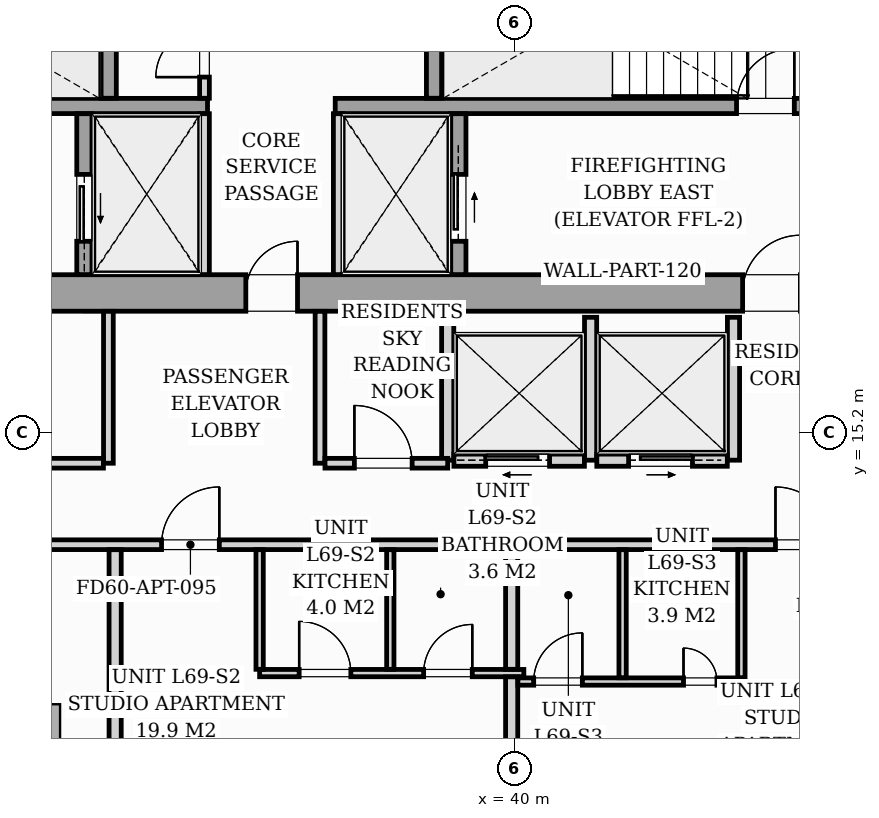
"""IFC4 building model, lengths in metres.
Left out: names, types, materials, properties, quantities, classifications, styles, units other than length and angle.
Written with IfcOpenShell. Run it as: python <this file> out.ifc"""

import sys

from ifc_helpers import new_model, si_unit, direction, frame, frame_2d, origin, origin_2d, place, context, subcontext, project, spatial, rectangle, i_section, extrude, source, transform, mapped, element, fill, save


model = new_model("IFC4")
c1 = context("Model", 3, precision=1e-05, world=origin(), true_north=direction((0.0, 1.0)))
c2 = subcontext(c1, "Body", "Model", "MODEL_VIEW")
j1 = project(units=[si_unit("LENGTHUNIT", "METRE"), si_unit("PLANEANGLEUNIT", "RADIAN")], contexts=[c1])
p1 = place(None, origin())
s1 = spatial("IfcSite", under=j1, at=p1, CompositionType="ELEMENT")
p2 = place(p1, origin())
s2 = spatial("IfcBuilding", under=s1, at=p2, CompositionType="ELEMENT")
p3 = place(p2, frame((0.0, 0.0, 239.7)))
s3 = spatial("IfcBuildingStorey", under=s2, at=p3, CompositionType="ELEMENT", Elevation=239.7)
m1 = source(origin(), c2, "Body", "SweptSolid", [
    extrude(i_section(OverallWidth=0.409, OverallDepth=0.425, WebThickness=0.033, FlangeThickness=0.052, FilletRadius=0.018, at=origin_2d()), origin(), (0.0, 0.0, 1.0), 3.296),
])
for number, where, z_axis, x_axis in (
    (1, (33.12, 17.4, 0.002), (0.0, 0.0, 1.0), (1.0, 0.0, 0.0)),
    (2, (38.88, 17.4, 0.002), (0.0, 0.0, 1.0), (1.0, 0.0, 0.0)),
):
    element("IfcColumn", number, at=place(p3, frame(where, z_axis=z_axis, x_axis=x_axis)), inside=s3, PredefinedType="PILASTER", context=c2, shape_type="MappedRepresentation", body=[
        mapped(m1, transform((0.0, 0.0, 0.0), scale=1.0)),
    ])
m2 = source(origin(), c2, "Body", "SweptSolid", [
    extrude(rectangle(XDim=0.85, YDim=0.85, at=origin_2d()), origin(), (0.0, 0.0, 1.0), 3.296),
])
p4 = place(p3, frame((32.1, 10.312, 0.002), z_axis=(0.0, 0.0, 1.0), x_axis=(0.995884398616, -0.090632580198, 0.0)))
e3 = element("IfcColumn", 3, at=p4, inside=s3, PredefinedType="COLUMN", context=c2, shape_type="MappedRepresentation", body=[
    mapped(m2, transform((0.0, 0.0, 0.0), scale=1.0)),
])
p5 = place(p3, frame((26.2, 17.5, 0.0), z_axis=(0.0, 0.0, 1.0), x_axis=(1.0, 0.0, 0.0)))
e4 = element("IfcWall", 4, at=p5, inside=s3, PredefinedType="SHEAR", context=c2, shape_type="SweptSolid", body=[
    extrude(rectangle(XDim=19.6, YDim=0.6, at=frame_2d((9.8, 0.0))), origin(), (0.0, 0.0, 1.0), 3.3),
])
p6 = place(p5, frame((0.95, 0.0, 0.0)))
e5 = element("IfcOpeningElement", 5, at=p6, cuts=e4, PredefinedType="OPENING", context=c2, shape_type="SweptSolid", body=[
    extrude(rectangle(XDim=0.95, YDim=2.06, at=frame_2d((0.475, 1.03))), frame((0.0, 0.31, 0.0), z_axis=(0.0, -1.0, 0.0), x_axis=(1.0, 0.0, 0.0)), (0.0, 0.0, 1.0), 0.62),
])
p7 = place(p5, frame((9.38, 0.0, 0.0)))
e6 = element("IfcOpeningElement", 6, at=p7, cuts=e4, PredefinedType="OPENING", context=c2, shape_type="SweptSolid", body=[
    extrude(rectangle(XDim=0.85, YDim=2.0, at=frame_2d((0.425, 1.0))), frame((0.0, 0.31, 0.0), z_axis=(0.0, -1.0, 0.0), x_axis=(1.0, 0.0, 0.0)), (0.0, 0.0, 1.0), 0.62),
])
p8 = place(p5, frame((17.55, 0.0, 0.0)))
e7 = element("IfcOpeningElement", 7, at=p8, cuts=e4, PredefinedType="OPENING", context=c2, shape_type="SweptSolid", body=[
    extrude(rectangle(XDim=0.95, YDim=2.06, at=frame_2d((0.475, 1.03))), frame((0.0, 0.31, 0.0), z_axis=(0.0, -1.0, 0.0), x_axis=(1.0, 0.0, 0.0)), (0.0, 0.0, 1.0), 0.62),
])
p9 = place(p3, frame((26.802, 20.575, 0.0), z_axis=(0.0, 0.0, 1.0), x_axis=(1.0, 0.0, 0.0)))
e8 = element("IfcWall", 8, at=p9, inside=s3, PredefinedType="SOLIDWALL", context=c2, shape_type="SweptSolid", body=[
    extrude(rectangle(XDim=8.148, YDim=0.25, at=frame_2d((4.074, 0.0))), origin(), (0.0, 0.0, 1.0), 3.3),
])
p10 = place(p9, frame((0.298, 0.0, 0.0)))
e9 = element("IfcOpeningElement", 9, at=p10, cuts=e8, PredefinedType="OPENING", context=c2, shape_type="SweptSolid", body=[
    extrude(rectangle(XDim=0.95, YDim=2.06, at=frame_2d((0.475, 1.03))), frame((0.0, 0.135, 0.0), z_axis=(0.0, -1.0, 0.0), x_axis=(1.0, 0.0, 0.0)), (0.0, 0.0, 1.0), 0.27),
])
p11 = place(p3, frame((37.05, 20.575, 0.0), z_axis=(0.0, 0.0, 1.0), x_axis=(1.0, 0.0, 0.0)))
e10 = element("IfcWall", 10, at=p11, inside=s3, PredefinedType="SOLIDWALL", context=c2, shape_type="SweptSolid", body=[
    extrude(rectangle(XDim=8.148, YDim=0.25, at=frame_2d((4.074, 0.0))), origin(), (0.0, 0.0, 1.0), 3.3),
])
p12 = place(p11, frame((6.6, 0.0, 0.0)))
e11 = element("IfcOpeningElement", 11, at=p12, cuts=e10, PredefinedType="OPENING", context=c2, shape_type="SweptSolid", body=[
    extrude(rectangle(XDim=0.95, YDim=2.06, at=frame_2d((0.475, 1.03))), frame((0.0, 0.135, 0.0), z_axis=(0.0, -1.0, 0.0), x_axis=(1.0, 0.0, 0.0)), (0.0, 0.0, 1.0), 0.27),
])
for number, where, z_axis, x_axis in (
    (12, (33.325, 20.702, 0.0), (0.0, 0.0, 1.0), (0.0, 1.0, 0.0)),
    (13, (38.675, 20.702, 0.0), (0.0, 0.0, 1.0), (0.0, 1.0, 0.0)),
):
    element("IfcWall", number, at=place(p3, frame(where, z_axis=z_axis, x_axis=x_axis)), inside=s3, PredefinedType="SOLIDWALL", context=c2, shape_type="SweptSolid", body=[
        extrude(rectangle(XDim=2.896, YDim=0.25, at=frame_2d((1.448, 0.0))), origin(), (0.0, 0.0, 1.0), 3.3),
    ])
p13 = place(p3, frame((32.925, 17.802, 0.0), z_axis=(0.0, 0.0, 1.0), x_axis=(0.0, 1.0, 0.0)))
e14 = element("IfcWall", 14, at=p13, inside=s3, PredefinedType="SOLIDWALL", context=c2, shape_type="SweptSolid", body=[
    extrude(rectangle(XDim=2.646, YDim=0.25, at=frame_2d((1.323, 0.0))), origin(), (0.0, 0.0, 1.0), 3.3),
])
p14 = place(p13, frame((0.548, 0.0, 0.0)))
e15 = element("IfcOpeningElement", 15, at=p14, cuts=e14, PredefinedType="OPENING", context=c2, shape_type="SweptSolid", body=[
    extrude(rectangle(XDim=1.1, YDim=2.08, at=frame_2d((0.55, 1.04))), frame((0.0, 0.135, 0.0), z_axis=(0.0, -1.0, 0.0), x_axis=(1.0, 0.0, 0.0)), (0.0, 0.0, 1.0), 0.27),
])
for number, where, z_axis, x_axis in (
    (16, (34.9, 17.802, 0.0), (0.0, 0.0, 1.0), (0.0, 1.0, 0.0)),
    (17, (37.1, 17.802, 0.0), (0.0, 0.0, 1.0), (0.0, 1.0, 0.0)),
):
    element("IfcWall", number, at=place(p3, frame(where, z_axis=z_axis, x_axis=x_axis)), inside=s3, PredefinedType="PARTITIONING", context=c2, shape_type="SweptSolid", body=[
        extrude(rectangle(XDim=2.646, YDim=0.16, at=frame_2d((1.323, 0.0))), origin(), (0.0, 0.0, 1.0), 3.04),
    ])
p15 = place(p3, frame((39.075, 17.802, 0.0), z_axis=(0.0, 0.0, 1.0), x_axis=(0.0, 1.0, 0.0)))
e18 = element("IfcWall", 18, at=p15, inside=s3, PredefinedType="SOLIDWALL", context=c2, shape_type="SweptSolid", body=[
    extrude(rectangle(XDim=2.646, YDim=0.25, at=frame_2d((1.323, 0.0))), origin(), (0.0, 0.0, 1.0), 3.3),
])
p16 = place(p15, frame((0.548, 0.0, 0.0)))
e19 = element("IfcOpeningElement", 19, at=p16, cuts=e18, PredefinedType="OPENING", context=c2, shape_type="SweptSolid", body=[
    extrude(rectangle(XDim=1.1, YDim=2.08, at=frame_2d((0.55, 1.04))), frame((0.0, 0.135, 0.0), z_axis=(0.0, -1.0, 0.0), x_axis=(1.0, 0.0, 0.0)), (0.0, 0.0, 1.0), 0.27),
])
p17 = place(p3, frame((34.9, 20.702, 0.0), z_axis=(0.0, 0.0, 1.0), x_axis=(0.0, 1.0, 0.0)))
e20 = element("IfcWall", 20, at=p17, inside=s3, PredefinedType="PARTITIONING", context=c2, shape_type="SweptSolid", body=[
    extrude(rectangle(XDim=2.896, YDim=0.16, at=frame_2d((1.448, 0.0))), origin(), (0.0, 0.0, 1.0), 3.04),
])
p18 = place(p17, frame((0.348, 0.0, 0.0)))
e21 = element("IfcOpeningElement", 21, at=p18, cuts=e20, PredefinedType="OPENING", context=c2, shape_type="SweptSolid", body=[
    extrude(rectangle(XDim=0.8, YDim=2.05, at=frame_2d((0.4, 1.025))), frame((0.0, 0.09, 0.0), z_axis=(0.0, -1.0, 0.0), x_axis=(1.0, 0.0, 0.0)), (0.0, 0.0, 1.0), 0.18),
])
for number, where, z_axis, x_axis in (
    (22, (38.9, 14.75, 0.0), (0.0, 0.0, 1.0), (0.0, 1.0, 0.0)),
    (23, (41.25, 14.75, 0.0), (0.0, 0.0, 1.0), (0.0, 1.0, 0.0)),
    (24, (43.6, 14.75, 0.0), (0.0, 0.0, 1.0), (0.0, 1.0, 0.0)),
):
    element("IfcWall", number, at=place(p3, frame(where, z_axis=z_axis, x_axis=x_axis)), inside=s3, PredefinedType="PARTITIONING", context=c2, shape_type="SweptSolid", body=[
        extrude(rectangle(XDim=2.35, YDim=0.2, at=frame_2d((1.175, 0.0))), origin(), (0.0, 0.0, 1.0), 3.04),
    ])
p19 = place(p3, frame((39.002, 14.75, 0.0), z_axis=(0.0, 0.0, 1.0), x_axis=(1.0, 0.0, 0.0)))
e25 = element("IfcWall", 25, at=p19, inside=s3, PredefinedType="PARTITIONING", context=c2, shape_type="SweptSolid", body=[
    extrude(rectangle(XDim=2.146, YDim=0.2, at=frame_2d((1.073, 0.0))), origin(), (0.0, 0.0, 1.0), 3.04),
])
p20 = place(p19, frame((0.523, 0.0, 0.0)))
e26 = element("IfcOpeningElement", 26, at=p20, cuts=e25, PredefinedType="OPENING", context=c2, shape_type="SweptSolid", body=[
    extrude(rectangle(XDim=1.05, YDim=2.08, at=frame_2d((0.525, 1.04))), frame((0.0, 0.11, 0.0), z_axis=(0.0, -1.0, 0.0), x_axis=(1.0, 0.0, 0.0)), (0.0, 0.0, 1.0), 0.22),
])
p21 = place(p3, frame((41.352, 14.75, 0.0), z_axis=(0.0, 0.0, 1.0), x_axis=(1.0, 0.0, 0.0)))
e27 = element("IfcWall", 27, at=p21, inside=s3, PredefinedType="PARTITIONING", context=c2, shape_type="SweptSolid", body=[
    extrude(rectangle(XDim=2.146, YDim=0.2, at=frame_2d((1.073, 0.0))), origin(), (0.0, 0.0, 1.0), 3.04),
])
p22 = place(p21, frame((0.523, 0.0, 0.0)))
e28 = element("IfcOpeningElement", 28, at=p22, cuts=e27, PredefinedType="OPENING", context=c2, shape_type="SweptSolid", body=[
    extrude(rectangle(XDim=1.05, YDim=2.08, at=frame_2d((0.525, 1.04))), frame((0.0, 0.11, 0.0), z_axis=(0.0, -1.0, 0.0), x_axis=(1.0, 0.0, 0.0)), (0.0, 0.0, 1.0), 0.22),
])
p23 = place(p3, frame((26.12, 13.36, 0.0), z_axis=(0.0, 0.0, 1.0), x_axis=(1.0, 0.0, 0.0)))
e29 = element("IfcWall", 29, at=p23, inside=s3, PredefinedType="PARTITIONING", context=c2, shape_type="SweptSolid", body=[
    extrude(rectangle(XDim=19.76, YDim=0.16, at=frame_2d((9.88, 0.0))), origin(), (0.0, 0.0, 1.0), 2.605),
])
p24 = place(p23, frame((5.221, 0.0, 0.0)))
e30 = element("IfcOpeningElement", 30, at=p24, cuts=e29, PredefinedType="OPENING", context=c2, shape_type="SweptSolid", body=[
    extrude(rectangle(XDim=0.95, YDim=2.06, at=frame_2d((0.475, 1.03))), frame((0.0, 0.09, 0.0), z_axis=(0.0, -1.0, 0.0), x_axis=(1.0, 0.0, 0.0)), (0.0, 0.0, 1.0), 0.18),
])
p25 = place(p23, frame((8.074, 0.0, 0.0)))
e31 = element("IfcOpeningElement", 31, at=p25, cuts=e29, PredefinedType="OPENING", context=c2, shape_type="SweptSolid", body=[
    extrude(rectangle(XDim=0.95, YDim=2.06, at=frame_2d((0.475, 1.03))), frame((0.0, 0.09, 0.0), z_axis=(0.0, -1.0, 0.0), x_axis=(1.0, 0.0, 0.0)), (0.0, 0.0, 1.0), 0.18),
])
p26 = place(p23, frame((18.17, 0.0, 0.0)))
e32 = element("IfcOpeningElement", 32, at=p26, cuts=e29, PredefinedType="OPENING", context=c2, shape_type="SweptSolid", body=[
    extrude(rectangle(XDim=0.95, YDim=2.06, at=frame_2d((0.475, 1.03))), frame((0.0, 0.09, 0.0), z_axis=(0.0, -1.0, 0.0), x_axis=(1.0, 0.0, 0.0)), (0.0, 0.0, 1.0), 0.18),
])
p27 = place(p3, frame((33.431, 9.086, 0.0), z_axis=(0.0, 0.0, 1.0), x_axis=(0.0, 1.0, 0.0)))
e33 = element("IfcWall", 33, at=p27, inside=s3, PredefinedType="PARTITIONING", context=c2, shape_type="SweptSolid", body=[
    extrude(rectangle(XDim=4.192, YDim=0.2, at=frame_2d((2.096, 0.0))), origin(), (0.0, 0.0, 1.0), 3.04),
])
p28 = place(p3, frame((35.807, 11.249, 0.0), z_axis=(0.0, 0.0, 1.0), x_axis=(1.0, 0.0, 0.0)))
e34 = element("IfcWall", 34, at=p28, inside=s3, PredefinedType="PARTITIONING", context=c2, shape_type="SweptSolid", body=[
    extrude(rectangle(XDim=4.345, YDim=0.12, at=frame_2d((2.173, 0.0))), origin(), (0.0, 0.0, 1.0), 3.04),
])
p29 = place(p28, frame((0.65, 0.0, 0.0)))
e35 = element("IfcOpeningElement", 35, at=p29, cuts=e34, PredefinedType="OPENING", context=c2, shape_type="SweptSolid", body=[
    extrude(rectangle(XDim=0.85, YDim=2.05, at=frame_2d((0.425, 1.025))), frame((0.0, 0.07, 0.0), z_axis=(0.0, -1.0, 0.0), x_axis=(1.0, 0.0, 0.0)), (0.0, 0.0, 1.0), 0.14),
])
p30 = place(p28, frame((2.697, 0.0, 0.0)))
e36 = element("IfcOpeningElement", 36, at=p30, cuts=e34, PredefinedType="OPENING", context=c2, shape_type="SweptSolid", body=[
    extrude(rectangle(XDim=0.8, YDim=2.02, at=frame_2d((0.4, 1.01))), frame((0.0, 0.07, 0.0), z_axis=(0.0, -1.0, 0.0), x_axis=(1.0, 0.0, 0.0)), (0.0, 0.0, 1.0), 0.14),
])
for number, where, z_axis, x_axis in (
    (37, (35.807, 11.311, 0.0), (0.0, 0.0, 1.0), (0.0, 1.0, 0.0)),
    (38, (37.956, 11.311, 0.0), (0.0, 0.0, 1.0), (0.0, 1.0, 0.0)),
):
    element("IfcWall", number, at=place(p3, frame(where, z_axis=z_axis, x_axis=x_axis)), inside=s3, PredefinedType="PARTITIONING", context=c2, shape_type="SweptSolid", body=[
        extrude(rectangle(XDim=1.967, YDim=0.12, at=frame_2d((0.983, 0.0))), origin(), (0.0, 0.0, 1.0), 3.04),
    ])
p31 = place(p3, frame((39.952, 8.675, 0.0), z_axis=(0.0, 0.0, 1.0), x_axis=(0.0, 1.0, 0.0)))
e39 = element("IfcWall", 39, at=p31, inside=s3, PredefinedType="PARTITIONING", context=c2, shape_type="SweptSolid", body=[
    extrude(rectangle(XDim=2.512, YDim=0.2, at=frame_2d((1.256, 0.0))), origin(), (0.0, 0.0, 1.0), 3.04),
])
p32 = place(p3, frame((39.952, 11.311, 0.0), z_axis=(0.0, 0.0, 1.0), x_axis=(0.0, 1.0, 0.0)))
e40 = element("IfcWall", 40, at=p32, inside=s3, PredefinedType="PARTITIONING", context=c2, shape_type="SweptSolid", body=[
    extrude(rectangle(XDim=1.967, YDim=0.2, at=frame_2d((0.983, 0.0))), origin(), (0.0, 0.0, 1.0), 3.04),
])
p33 = place(p3, frame((40.054, 11.11, 0.0), z_axis=(0.0, 0.0, 1.0), x_axis=(1.0, 0.0, 0.0)))
e41 = element("IfcWall", 41, at=p33, inside=s3, PredefinedType="PARTITIONING", context=c2, shape_type="SweptSolid", body=[
    extrude(rectangle(XDim=3.676, YDim=0.12, at=frame_2d((1.838, 0.0))), origin(), (0.0, 0.0, 1.0), 3.04),
])
p34 = place(p33, frame((0.26, 0.0, 0.0)))
e42 = element("IfcOpeningElement", 42, at=p34, cuts=e41, PredefinedType="OPENING", context=c2, shape_type="SweptSolid", body=[
    extrude(rectangle(XDim=0.8, YDim=2.02, at=frame_2d((0.4, 1.01))), frame((0.0, 0.07, 0.0), z_axis=(0.0, -1.0, 0.0), x_axis=(1.0, 0.0, 0.0)), (0.0, 0.0, 1.0), 0.14),
])
p35 = place(p33, frame((2.724, 0.0, 0.0)))
e43 = element("IfcOpeningElement", 43, at=p35, cuts=e41, PredefinedType="OPENING", context=c2, shape_type="SweptSolid", body=[
    extrude(rectangle(XDim=0.55, YDim=2.0, at=frame_2d((0.275, 1.0))), frame((0.0, 0.07, 0.0), z_axis=(0.0, -1.0, 0.0), x_axis=(1.0, 0.0, 0.0)), (0.0, 0.0, 1.0), 0.14),
])
for number, where, z_axis, x_axis in (
    (44, (43.73, 11.172, 0.0), (0.0, 0.0, 1.0), (0.0, 1.0, 0.0)),
    (45, (41.776, 11.172, 0.0), (0.0, 0.0, 1.0), (0.0, 1.0, 0.0)),
):
    element("IfcWall", number, at=place(p3, frame(where, z_axis=z_axis, x_axis=x_axis)), inside=s3, PredefinedType="PARTITIONING", context=c2, shape_type="SweptSolid", body=[
        extrude(rectangle(XDim=2.106, YDim=0.12, at=frame_2d((1.053, 0.0))), origin(), (0.0, 0.0, 1.0), 3.04),
    ])
p36 = place(p3, frame((33.32, 14.7, 0.0), z_axis=(0.0, 0.0, 1.0), x_axis=(0.0, 1.0, 0.0)))
e46 = element("IfcWall", 46, at=p36, inside=s3, PredefinedType="PARTITIONING", context=c2, shape_type="SweptSolid", body=[
    extrude(rectangle(XDim=2.498, YDim=0.16, at=frame_2d((1.249, 0.0))), origin(), (0.0, 0.0, 1.0), 3.04),
])
p37 = place(p3, frame((28.442, 14.7, 0.0), z_axis=(0.0, 0.0, 1.0), x_axis=(1.0, 0.0, 0.0)))
e47 = element("IfcWall", 47, at=p37, inside=s3, PredefinedType="PARTITIONING", context=c2, shape_type="SweptSolid", body=[
    extrude(rectangle(XDim=4.796, YDim=0.16, at=frame_2d((2.398, 0.0))), origin(), (0.0, 0.0, 1.0), 2.605),
])
p38 = place(p37, frame((1.923, 0.0, 0.0)))
e48 = element("IfcOpeningElement", 48, at=p38, cuts=e47, PredefinedType="OPENING", context=c2, shape_type="SweptSolid", body=[
    extrude(rectangle(XDim=0.95, YDim=2.06, at=frame_2d((0.475, 1.03))), frame((0.0, 0.09, 0.0), z_axis=(0.0, -1.0, 0.0), x_axis=(1.0, 0.0, 0.0)), (0.0, 0.0, 1.0), 0.18),
])
p39 = place(p3, frame((36.8, 14.7, 0.0), z_axis=(0.0, 0.0, 1.0), x_axis=(0.0, 1.0, 0.0)))
e49 = element("IfcWall", 49, at=p39, inside=s3, PredefinedType="PARTITIONING", context=c2, shape_type="SweptSolid", body=[
    extrude(rectangle(XDim=2.498, YDim=0.16, at=frame_2d((1.249, 0.0))), origin(), (0.0, 0.0, 1.0), 3.04),
])
p40 = place(p3, frame((36.882, 14.7, 0.0), z_axis=(0.0, 0.0, 1.0), x_axis=(1.0, 0.0, 0.0)))
e50 = element("IfcWall", 50, at=p40, inside=s3, PredefinedType="PARTITIONING", context=c2, shape_type="SweptSolid", body=[
    extrude(rectangle(XDim=2.018, YDim=0.16, at=frame_2d((1.009, 0.0))), origin(), (0.0, 0.0, 1.0), 3.04),
])
p41 = place(p40, frame((0.483, 0.0, 0.0)))
e51 = element("IfcOpeningElement", 51, at=p41, cuts=e50, PredefinedType="OPENING", context=c2, shape_type="SweptSolid", body=[
    extrude(rectangle(XDim=0.95, YDim=2.06, at=frame_2d((0.475, 1.03))), frame((0.0, 0.09, 0.0), z_axis=(0.0, -1.0, 0.0), x_axis=(1.0, 0.0, 0.0)), (0.0, 0.0, 1.0), 0.18),
])
m3 = source(origin(), c2, "Body", "SweptSolid", [
    extrude(rectangle(XDim=0.85, YDim=2.0, at=frame_2d((0.425, 1.0))), frame((0.0, 0.025, 0.0), z_axis=(0.0, -1.0, 0.0), x_axis=(1.0, 0.0, 0.0)), (0.0, 0.0, 1.0), 0.05),
])
p42 = place(p7, origin())
e52 = element("IfcDoor", 52, at=p42, inside=s3, OperationType="SINGLE_SWING_RIGHT", PredefinedType="DOOR", context=c2, shape_type="MappedRepresentation", body=[
    mapped(m3, transform((0.0, 0.0, 0.0), scale=1.0)),
])
fill(e6, e52)
m4 = source(origin(), c2, "Body", "SweptSolid", [
    extrude(rectangle(XDim=0.95, YDim=2.06, at=frame_2d((0.475, 1.03))), frame((0.0, 0.025, 0.0), z_axis=(0.0, -1.0, 0.0), x_axis=(1.0, 0.0, 0.0)), (0.0, 0.0, 1.0), 0.05),
])
p43 = place(p8, origin())
e53 = element("IfcDoor", 53, at=p43, inside=s3, OperationType="SINGLE_SWING_RIGHT", PredefinedType="DOOR", context=c2, shape_type="MappedRepresentation", body=[
    mapped(m4, transform((0.0, 0.0, 0.0), scale=1.0)),
])
fill(e7, e53)
p44 = place(p12, origin())
e54 = element("IfcDoor", 54, at=p44, inside=s3, OperationType="SINGLE_SWING_RIGHT", PredefinedType="DOOR", context=c2, shape_type="MappedRepresentation", body=[
    mapped(m4, transform((0.0, 0.0, 0.0), scale=1.0)),
])
fill(e11, e54)
m5 = source(origin(), c2, "Body", "SweptSolid", [
    extrude(rectangle(XDim=1.1, YDim=2.08, at=frame_2d((0.55, 1.04))), frame((0.0, 0.025, 0.0), z_axis=(0.0, -1.0, 0.0), x_axis=(1.0, 0.0, 0.0)), (0.0, 0.0, 1.0), 0.05),
])
p45 = place(p14, origin())
e55 = element("IfcDoor", 55, at=p45, inside=s3, OperationType="SLIDING_TO_LEFT", PredefinedType="DOOR", context=c2, shape_type="MappedRepresentation", body=[
    mapped(m5, transform((0.0, 0.0, 0.0), scale=1.0)),
])
fill(e15, e55)
p46 = place(p16, origin())
e56 = element("IfcDoor", 56, at=p46, inside=s3, OperationType="SLIDING_TO_RIGHT", PredefinedType="DOOR", context=c2, shape_type="MappedRepresentation", body=[
    mapped(m5, transform((0.0, 0.0, 0.0), scale=1.0)),
])
fill(e19, e56)
m6 = source(origin(), c2, "Body", "SweptSolid", [
    extrude(rectangle(XDim=0.8, YDim=2.05, at=frame_2d((0.4, 1.025))), frame((0.0, 0.025, 0.0), z_axis=(0.0, -1.0, 0.0), x_axis=(1.0, 0.0, 0.0)), (0.0, 0.0, 1.0), 0.05),
])
p47 = place(p18, origin())
e57 = element("IfcDoor", 57, at=p47, inside=s3, OperationType="SINGLE_SWING_LEFT", PredefinedType="DOOR", context=c2, shape_type="MappedRepresentation", body=[
    mapped(m6, transform((0.0, 0.0, 0.0), scale=1.0)),
])
fill(e21, e57)
m7 = source(origin(), c2, "Body", "SweptSolid", [
    extrude(rectangle(XDim=1.05, YDim=2.08, at=frame_2d((0.525, 1.04))), frame((0.0, 0.025, 0.0), z_axis=(0.0, -1.0, 0.0), x_axis=(1.0, 0.0, 0.0)), (0.0, 0.0, 1.0), 0.05),
])
p48 = place(p20, origin())
e58 = element("IfcDoor", 58, at=p48, inside=s3, OperationType="SLIDING_TO_LEFT", PredefinedType="DOOR", context=c2, shape_type="MappedRepresentation", body=[
    mapped(m7, transform((0.0, 0.0, 0.0), scale=1.0)),
])
fill(e26, e58)
p49 = place(p22, origin())
e59 = element("IfcDoor", 59, at=p49, inside=s3, OperationType="SLIDING_TO_RIGHT", PredefinedType="DOOR", context=c2, shape_type="MappedRepresentation", body=[
    mapped(m7, transform((0.0, 0.0, 0.0), scale=1.0)),
])
fill(e28, e59)
m8 = source(origin(), c2, "Body", "SweptSolid", [
    extrude(rectangle(XDim=0.95, YDim=2.06, at=frame_2d((0.475, 1.03))), frame((0.0, 0.025, 0.0), z_axis=(0.0, -1.0, 0.0), x_axis=(1.0, 0.0, 0.0)), (0.0, 0.0, 1.0), 0.05),
])
p50 = place(p25, origin())
e60 = element("IfcDoor", 60, at=p50, inside=s3, OperationType="SINGLE_SWING_RIGHT", PredefinedType="DOOR", context=c2, shape_type="MappedRepresentation", body=[
    mapped(m8, transform((0.0, 0.0, 0.0), scale=1.0)),
])
fill(e31, e60)
m9 = source(origin(), c2, "Body", "SweptSolid", [
    extrude(rectangle(XDim=0.85, YDim=2.05, at=frame_2d((0.425, 1.025))), frame((0.0, 0.025, 0.0), z_axis=(0.0, -1.0, 0.0), x_axis=(1.0, 0.0, 0.0)), (0.0, 0.0, 1.0), 0.05),
])
p51 = place(p29, origin())
e61 = element("IfcDoor", 61, at=p51, inside=s3, OperationType="SINGLE_SWING_LEFT", PredefinedType="DOOR", context=c2, shape_type="MappedRepresentation", body=[
    mapped(m9, transform((0.0, 0.0, 0.0), scale=1.0)),
])
fill(e35, e61)
m10 = source(origin(), c2, "Body", "SweptSolid", [
    extrude(rectangle(XDim=0.8, YDim=2.02, at=frame_2d((0.4, 1.01))), frame((0.0, 0.025, 0.0), z_axis=(0.0, -1.0, 0.0), x_axis=(1.0, 0.0, 0.0)), (0.0, 0.0, 1.0), 0.05),
])
p52 = place(p30, origin())
e62 = element("IfcDoor", 62, at=p52, inside=s3, OperationType="SINGLE_SWING_RIGHT", PredefinedType="DOOR", context=c2, shape_type="MappedRepresentation", body=[
    mapped(m10, transform((0.0, 0.0, 0.0), scale=1.0)),
])
fill(e36, e62)
p53 = place(p26, origin())
e63 = element("IfcDoor", 63, at=p53, inside=s3, OperationType="SINGLE_SWING_LEFT", PredefinedType="DOOR", context=c2, shape_type="MappedRepresentation", body=[
    mapped(m8, transform((0.0, 0.0, 0.0), scale=1.0)),
])
fill(e32, e63)
p54 = place(p34, origin())
e64 = element("IfcDoor", 64, at=p54, inside=s3, OperationType="SINGLE_SWING_RIGHT", PredefinedType="DOOR", context=c2, shape_type="MappedRepresentation", body=[
    mapped(m10, transform((0.0, 0.0, 0.0), scale=1.0)),
])
fill(e42, e64)
m11 = source(origin(), c2, "Body", "SweptSolid", [
    extrude(rectangle(XDim=0.55, YDim=2.0, at=frame_2d((0.275, 1.0))), frame((0.0, 0.025, 0.0), z_axis=(0.0, -1.0, 0.0), x_axis=(1.0, 0.0, 0.0)), (0.0, 0.0, 1.0), 0.05),
])
p55 = place(p35, origin())
e65 = element("IfcDoor", 65, at=p55, inside=s3, OperationType="SINGLE_SWING_LEFT", PredefinedType="DOOR", context=c2, shape_type="MappedRepresentation", body=[
    mapped(m11, transform((0.0, 0.0, 0.0), scale=1.0)),
])
fill(e43, e65)
p56 = place(p41, origin())
e66 = element("IfcDoor", 66, at=p56, inside=s3, OperationType="SINGLE_SWING_LEFT", PredefinedType="DOOR", context=c2, shape_type="MappedRepresentation", body=[
    mapped(m8, transform((0.0, 0.0, 0.0), scale=1.0)),
])
fill(e51, e66)
save(model, sys.argv[1])
